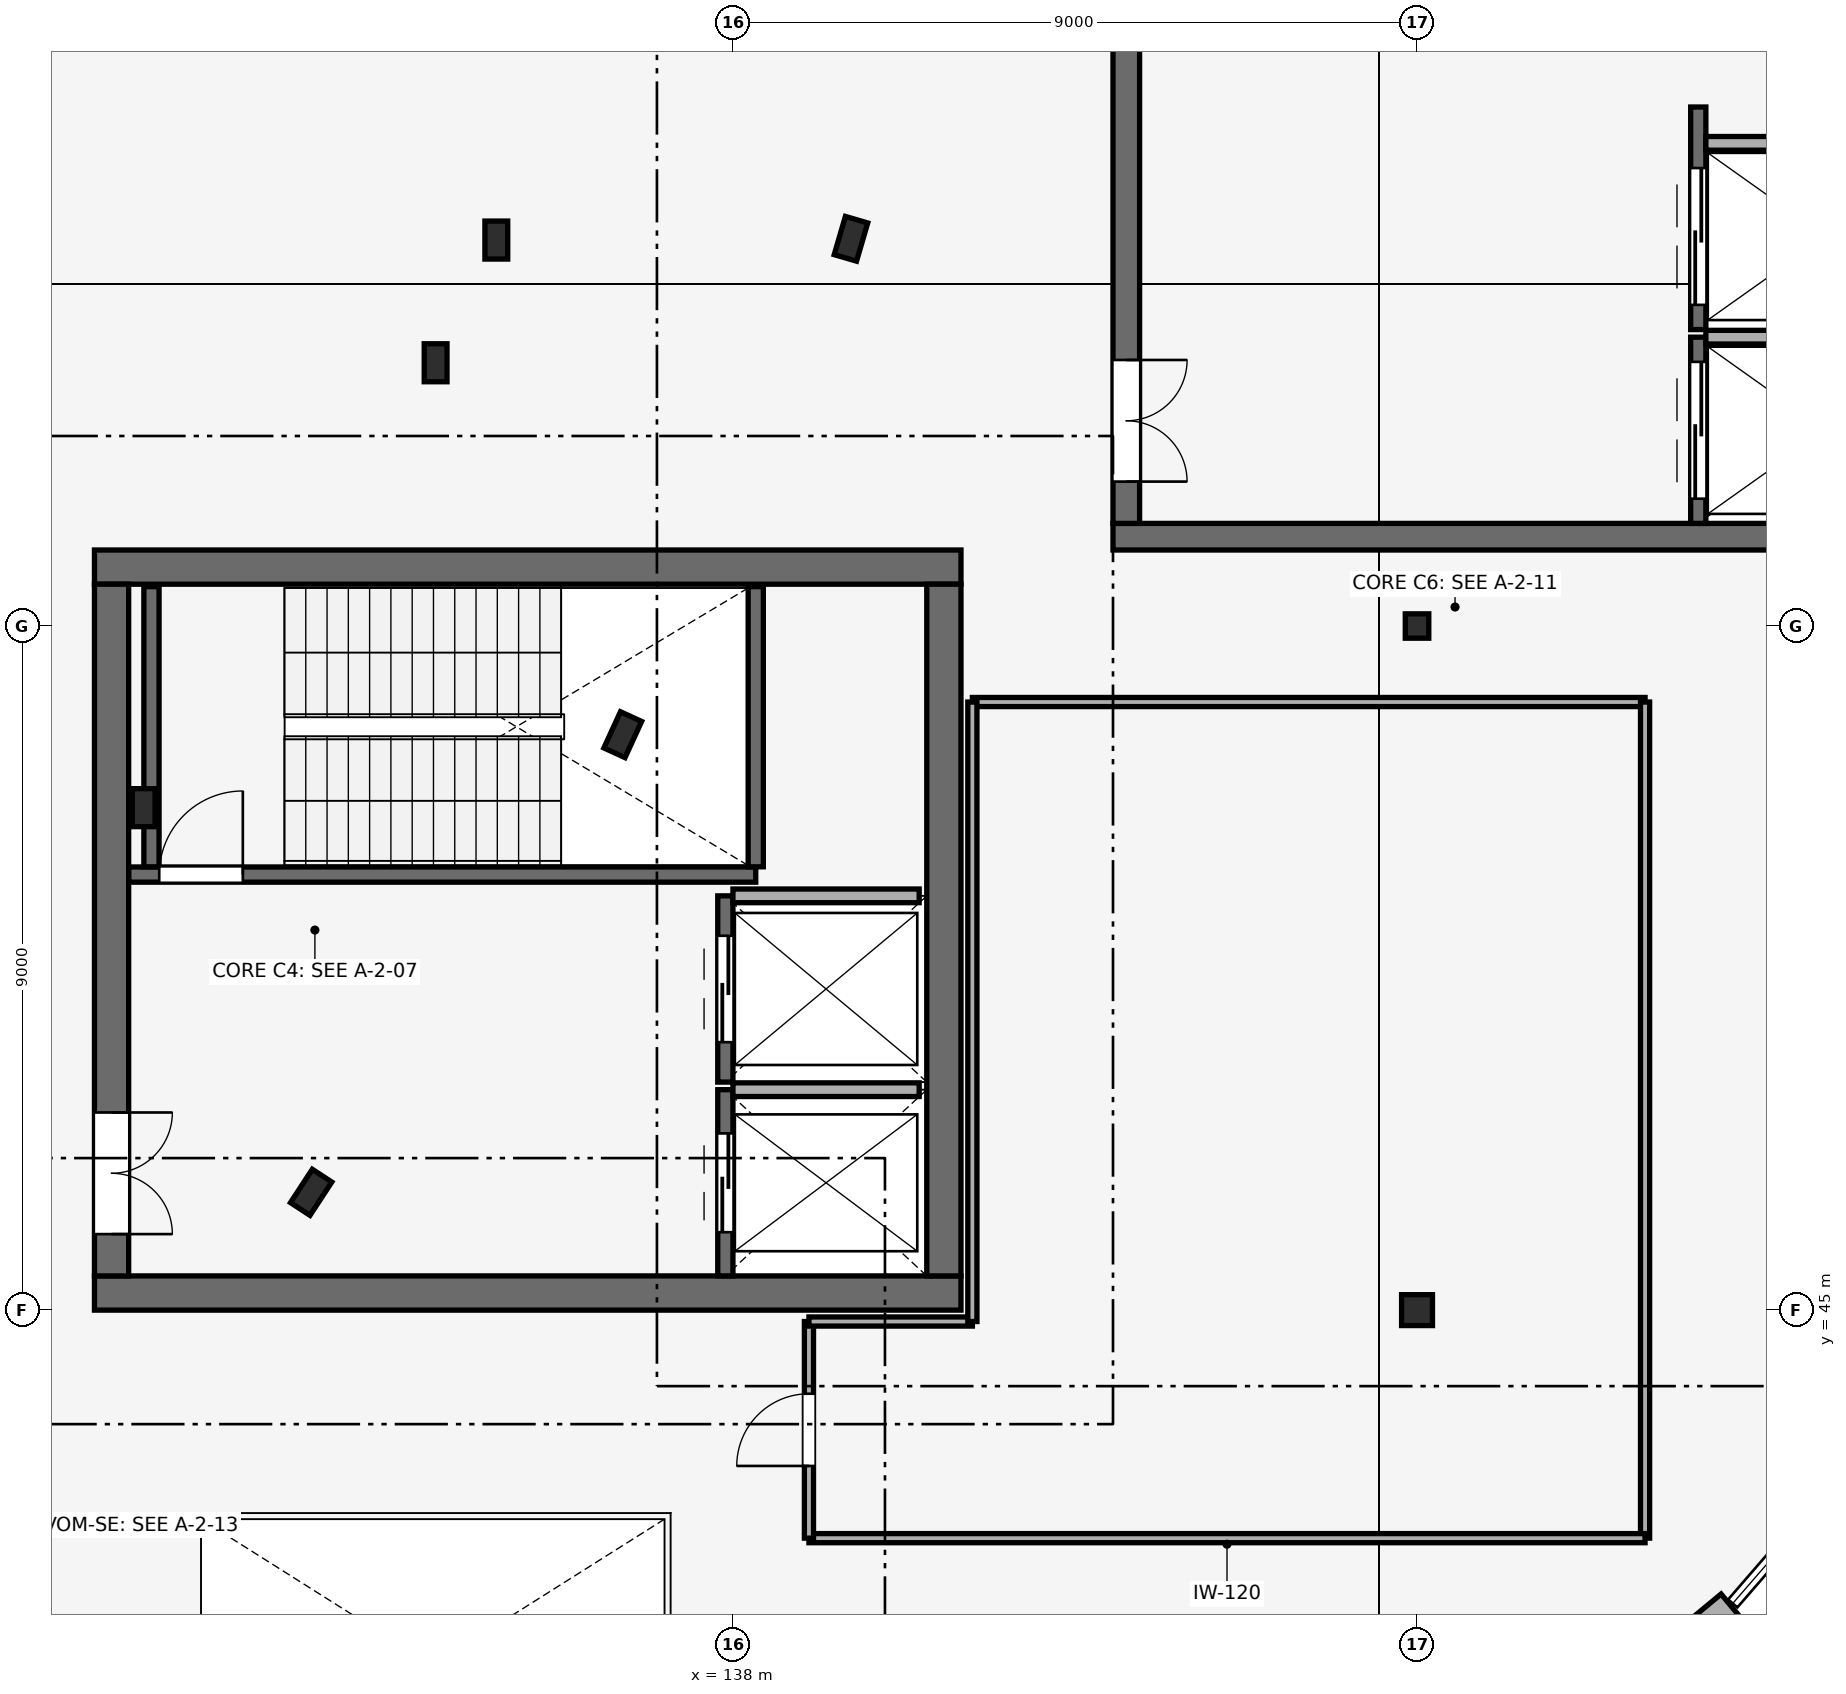
"""IFC4 building model, lengths in metres.
Left out: names, types, materials, properties, quantities, classifications, styles, units other than length and angle.
Written with IfcOpenShell. Run it as: python <this file> out.ifc"""

import sys

from ifc_helpers import new_model, si_unit, direction, frame, frame_2d, origin, origin_2d, place, context, subcontext, project, spatial, rectangle, hollow_circle, i_section, extrude, element, fill, save


model = new_model("IFC4")
c1 = context("Model", 3, precision=1e-05, world=origin(), true_north=direction((0.0, 1.0)))
c2 = subcontext(c1, "Body", "Model", "MODEL_VIEW")
j1 = project(units=[si_unit("LENGTHUNIT", "METRE"), si_unit("PLANEANGLEUNIT", "RADIAN")], contexts=[c1])
p1 = place(None, origin())
s1 = spatial("IfcSite", under=j1, at=p1, CompositionType="ELEMENT")
p2 = place(p1, origin())
s2 = spatial("IfcBuilding", under=s1, at=p2, CompositionType="ELEMENT")
p3 = place(p2, frame((0.0, 0.0, 5.4)))
s3 = spatial("IfcBuildingStorey", under=s2, at=p3, CompositionType="ELEMENT", Elevation=5.4)
for number, where, z_axis, x_axis in (
    (1, (132.451, 46.55, 0.0), (0.0, 0.0, 1.0), (0.837, -0.547, 0.0)),
    (2, (136.55, 52.57, 0.0), (0.0, 0.0, 1.0), (0.909, -0.417, 0.0)),
    (3, (139.553, 59.094, 0.0), (0.0, 0.0, 1.0), (0.96, -0.281, 0.0)),
):
    element("IfcColumn", number, at=place(p3, frame(where, z_axis=z_axis, x_axis=x_axis)), inside=s3, PredefinedType="COLUMN", context=c2, shape_type="SweptSolid", body=[
        extrude(i_section(OverallWidth=0.306, OverallDepth=0.524, WebThickness=0.021, FlangeThickness=0.04, FilletRadius=0.027, at=origin_2d()), origin(), (0.0, 0.0, 1.0), 4.8),
    ])
for number, where, z_axis, x_axis in (
    (4, (134.088, 57.463, 0.0), (0.0, 0.0, 1.0), (1.0, 0.0, 0.0)),
    (5, (134.887, 59.077, 0.0), (0.0, 0.0, 1.0), (1.0, 0.0, 0.0)),
):
    element("IfcColumn", number, at=place(p3, frame(where, z_axis=z_axis, x_axis=x_axis)), inside=s3, PredefinedType="COLUMN", context=c2, shape_type="SweptSolid", body=[
        extrude(i_section(OverallWidth=0.3, OverallDepth=0.5, WebThickness=0.014, FlangeThickness=0.028, FilletRadius=0.027, at=origin_2d()), origin(), (0.0, 0.0, 1.0), 4.8),
    ])
p4 = place(p3, frame((147.0, 45.0, 0.0), z_axis=(0.0, 0.0, 1.0), x_axis=(1.0, 0.0, 0.0)))
e6 = element("IfcColumn", 6, at=p4, inside=s3, PredefinedType="COLUMN", context=c2, shape_type="SweptSolid", body=[
    extrude(hollow_circle(Radius=0.203, WallThickness=0.016, at=origin_2d()), origin(), (0.0, 0.0, 1.0), 4.8),
])
p5 = place(p3, frame((147.0, 54.0, 0.0), z_axis=(0.0, 0.0, 1.0), x_axis=(1.0, 0.0, 0.0)))
e7 = element("IfcColumn", 7, at=p5, inside=s3, PredefinedType="COLUMN", context=c2, shape_type="SweptSolid", body=[
    extrude(i_section(OverallWidth=0.309, OverallDepth=0.321, WebThickness=0.014, FlangeThickness=0.022, FilletRadius=0.015, at=origin_2d()), origin(), (0.0, 0.0, 1.0), 4.8),
])
for number, where, z_axis, x_axis in (
    (8, (129.6, 45.225, 0.0), (0.0, 0.0, 1.0), (1.0, 0.0, 0.0)),
    (9, (129.6, 54.775, 0.0), (0.0, 0.0, 1.0), (1.0, 0.0, 0.0)),
):
    element("IfcWall", number, at=place(p3, frame(where, z_axis=z_axis, x_axis=x_axis)), inside=s3, PredefinedType="SHEAR", context=c2, shape_type="SweptSolid", body=[
        extrude(rectangle(XDim=11.4, YDim=0.45, at=frame_2d((5.7, 0.0))), origin(), (0.0, 0.0, 1.0), 4.8),
    ])
p6 = place(p3, frame((129.825, 45.45, 0.0), z_axis=(0.0, 0.0, 1.0), x_axis=(0.0, 1.0, 0.0)))
e10 = element("IfcWall", 10, at=p6, inside=s3, PredefinedType="SHEAR", context=c2, shape_type="SweptSolid", body=[
    extrude(rectangle(XDim=9.1, YDim=0.45, at=frame_2d((4.55, 0.0))), origin(), (0.0, 0.0, 1.0), 4.8),
])
p7 = place(p6, frame((0.55, 0.0, 0.0)))
e11 = element("IfcOpeningElement", 11, at=p7, cuts=e10, PredefinedType="OPENING", context=c2, shape_type="SweptSolid", body=[
    extrude(rectangle(XDim=1.6, YDim=2.2, at=frame_2d((0.8, 1.1))), frame((0.0, 0.235, 0.0), z_axis=(0.0, -1.0, 0.0), x_axis=(1.0, 0.0, 0.0)), (0.0, 0.0, 1.0), 0.47),
])
p8 = place(p3, frame((140.775, 45.45, 0.0), z_axis=(0.0, 0.0, 1.0), x_axis=(0.0, 1.0, 0.0)))
e12 = element("IfcWall", 12, at=p8, inside=s3, PredefinedType="SHEAR", context=c2, shape_type="SweptSolid", body=[
    extrude(rectangle(XDim=9.1, YDim=0.45, at=frame_2d((4.55, 0.0))), origin(), (0.0, 0.0, 1.0), 4.8),
])
p9 = place(p3, frame((143.0, 55.175, 0.0), z_axis=(0.0, 0.0, 1.0), x_axis=(1.0, 0.0, 0.0)))
e13 = element("IfcWall", 13, at=p9, inside=s3, PredefinedType="SHEAR", context=c2, shape_type="SweptSolid", body=[
    extrude(rectangle(XDim=11.4, YDim=0.35, at=frame_2d((5.7, 0.0))), origin(), (0.0, 0.0, 1.0), 4.8),
])
p10 = place(p3, frame((143.175, 55.35, 0.0), z_axis=(0.0, 0.0, 1.0), x_axis=(0.0, 1.0, 0.0)))
e14 = element("IfcWall", 14, at=p10, inside=s3, PredefinedType="SHEAR", context=c2, shape_type="SweptSolid", body=[
    extrude(rectangle(XDim=9.3, YDim=0.35, at=frame_2d((4.65, 0.0))), origin(), (0.0, 0.0, 1.0), 4.8),
])
p11 = place(p10, frame((0.55, 0.0, 0.0)))
e15 = element("IfcOpeningElement", 15, at=p11, cuts=e14, PredefinedType="OPENING", context=c2, shape_type="SweptSolid", body=[
    extrude(rectangle(XDim=1.6, YDim=2.2, at=frame_2d((0.8, 1.1))), frame((0.0, 0.185, 0.0), z_axis=(0.0, -1.0, 0.0), x_axis=(1.0, 0.0, 0.0)), (0.0, 0.0, 1.0), 0.37),
])
p12 = place(p3, frame((130.248, 51.611, 0.0), z_axis=(0.0, 0.0, 1.0), x_axis=(1.0, 0.0, 0.0)))
e16 = element("IfcColumn", 16, at=p12, inside=s3, PredefinedType="COLUMN", context=c2, shape_type="SweptSolid", body=[
    extrude(i_section(OverallWidth=0.3, OverallDepth=0.5, WebThickness=0.014, FlangeThickness=0.028, FilletRadius=0.027, at=origin_2d()), origin(), (0.0, 0.0, 1.0), 4.8),
])
p13 = place(p3, frame((151.128, 41.111, 0.0), z_axis=(0.0, 0.0, 1.0), x_axis=(-0.770002821077, -0.638040481109, 0.0)))
e17 = element("IfcWall", 17, at=p13, inside=s3, PredefinedType="STANDARD", context=c2, shape_type="SweptSolid", body=[
    extrude(rectangle(XDim=9.51, YDim=0.4, at=frame_2d((4.755, 0.0))), origin(), (0.0, 0.0, 1.0), 4.52),
])
p14 = place(p13, frame((3.155, 0.0, 0.95)))
e18 = element("IfcOpeningElement", 18, at=p14, cuts=e17, PredefinedType="OPENING", context=c2, shape_type="SweptSolid", body=[
    extrude(rectangle(XDim=3.2, YDim=1.8, at=frame_2d((1.6, 0.9))), frame((0.0, 0.21, 0.0), z_axis=(0.0, -1.0, 0.0), x_axis=(1.0, 0.0, 0.0)), (0.0, 0.0, 1.0), 0.42),
])
p15 = place(p3, frame((137.9, 45.45, 0.0), z_axis=(0.0, 0.0, 1.0), x_axis=(0.0, 1.0, 0.0)))
e19 = element("IfcWall", 19, at=p15, inside=s3, PredefinedType="SHEAR", context=c2, shape_type="SweptSolid", body=[
    extrude(rectangle(XDim=2.45, YDim=0.2, at=frame_2d((1.225, 0.0))), origin(), (0.0, 0.0, 1.0), 4.52),
])
p16 = place(p15, frame((0.575, 0.0, 0.0)))
e20 = element("IfcOpeningElement", 20, at=p16, cuts=e19, PredefinedType="OPENING", context=c2, shape_type="SweptSolid", body=[
    extrude(rectangle(XDim=1.3, YDim=2.2, at=frame_2d((0.65, 1.1))), frame((0.0, 0.11, 0.0), z_axis=(0.0, -1.0, 0.0), x_axis=(1.0, 0.0, 0.0)), (0.0, 0.0, 1.0), 0.22),
])
p17 = place(p3, frame((138.0, 47.9, 0.0), z_axis=(0.0, 0.0, 1.0), x_axis=(1.0, 0.0, 0.0)))
e21 = element("IfcWall", 21, at=p17, inside=s3, PredefinedType="PARTITIONING", context=c2, shape_type="SweptSolid", body=[
    extrude(rectangle(XDim=2.45, YDim=0.18, at=frame_2d((1.225, 0.0))), origin(), (0.0, 0.0, 1.0), 4.8),
])
p18 = place(p3, frame((137.9, 48.0, 0.0), z_axis=(0.0, 0.0, 1.0), x_axis=(0.0, 1.0, 0.0)))
e22 = element("IfcWall", 22, at=p18, inside=s3, PredefinedType="SHEAR", context=c2, shape_type="SweptSolid", body=[
    extrude(rectangle(XDim=2.45, YDim=0.2, at=frame_2d((1.225, 0.0))), origin(), (0.0, 0.0, 1.0), 4.52),
])
p19 = place(p18, frame((0.525, 0.0, 0.0)))
e23 = element("IfcOpeningElement", 23, at=p19, cuts=e22, PredefinedType="OPENING", context=c2, shape_type="SweptSolid", body=[
    extrude(rectangle(XDim=1.4, YDim=2.2, at=frame_2d((0.7, 1.1))), frame((0.0, 0.11, 0.0), z_axis=(0.0, -1.0, 0.0), x_axis=(1.0, 0.0, 0.0)), (0.0, 0.0, 1.0), 0.22),
])
p20 = place(p3, frame((138.0, 50.45, 0.0), z_axis=(0.0, 0.0, 1.0), x_axis=(1.0, 0.0, 0.0)))
e24 = element("IfcWall", 24, at=p20, inside=s3, PredefinedType="PARTITIONING", context=c2, shape_type="SweptSolid", body=[
    extrude(rectangle(XDim=2.45, YDim=0.18, at=frame_2d((1.225, 0.0))), origin(), (0.0, 0.0, 1.0), 4.8),
])
p21 = place(p3, frame((150.7, 55.35, 0.0), z_axis=(0.0, 0.0, 1.0), x_axis=(0.0, 1.0, 0.0)))
e25 = element("IfcWall", 25, at=p21, inside=s3, PredefinedType="SHEAR", context=c2, shape_type="SweptSolid", body=[
    extrude(rectangle(XDim=2.45, YDim=0.2, at=frame_2d((1.225, 0.0))), origin(), (0.0, 0.0, 1.0), 4.52),
])
p22 = place(p21, frame((0.325, 0.0, 0.0)))
e26 = element("IfcOpeningElement", 26, at=p22, cuts=e25, PredefinedType="OPENING", context=c2, shape_type="SweptSolid", body=[
    extrude(rectangle(XDim=1.8, YDim=2.4, at=frame_2d((0.9, 1.2))), frame((0.0, 0.11, 0.0), z_axis=(0.0, -1.0, 0.0), x_axis=(1.0, 0.0, 0.0)), (0.0, 0.0, 1.0), 0.22),
])
p23 = place(p3, frame((150.8, 57.8, 0.0), z_axis=(0.0, 0.0, 1.0), x_axis=(1.0, 0.0, 0.0)))
e27 = element("IfcWall", 27, at=p23, inside=s3, PredefinedType="PARTITIONING", context=c2, shape_type="SweptSolid", body=[
    extrude(rectangle(XDim=3.15, YDim=0.18, at=frame_2d((1.575, 0.0))), origin(), (0.0, 0.0, 1.0), 4.8),
])
p24 = place(p3, frame((150.7, 57.9, 0.0), z_axis=(0.0, 0.0, 1.0), x_axis=(0.0, 1.0, 0.0)))
e28 = element("IfcWall", 28, at=p24, inside=s3, PredefinedType="SHEAR", context=c2, shape_type="SweptSolid", body=[
    extrude(rectangle(XDim=2.928, YDim=0.2, at=frame_2d((1.464, 0.0))), origin(), (0.0, 0.0, 1.0), 4.52),
])
p25 = place(p24, frame((0.325, 0.0, 0.0)))
e29 = element("IfcOpeningElement", 29, at=p25, cuts=e28, PredefinedType="OPENING", context=c2, shape_type="SweptSolid", body=[
    extrude(rectangle(XDim=1.8, YDim=2.4, at=frame_2d((0.9, 1.2))), frame((0.0, 0.11, 0.0), z_axis=(0.0, -1.0, 0.0), x_axis=(1.0, 0.0, 0.0)), (0.0, 0.0, 1.0), 0.22),
])
p26 = place(p3, frame((150.8, 60.35, 0.0), z_axis=(0.0, 0.0, 1.0), x_axis=(1.0, 0.0, 0.0)))
e30 = element("IfcWall", 30, at=p26, inside=s3, PredefinedType="PARTITIONING", context=c2, shape_type="SweptSolid", body=[
    extrude(rectangle(XDim=3.15, YDim=0.18, at=frame_2d((1.575, 0.0))), origin(), (0.0, 0.0, 1.0), 4.8),
])
p27 = place(p3, frame((130.052, 50.73, 0.0), z_axis=(0.0, 0.0, 1.0), x_axis=(1.0, 0.0, 0.0)))
e31 = element("IfcWall", 31, at=p27, inside=s3, PredefinedType="SHEAR", context=c2, shape_type="SweptSolid", body=[
    extrude(rectangle(XDim=8.248, YDim=0.2, at=frame_2d((4.124, 0.0))), origin(), (0.0, 0.0, 1.0), 4.8),
])
p28 = place(p27, frame((0.4, 0.0, 0.0)))
e32 = element("IfcOpeningElement", 32, at=p28, cuts=e31, PredefinedType="OPENING", context=c2, shape_type="SweptSolid", body=[
    extrude(rectangle(XDim=1.1, YDim=2.15, at=frame_2d((0.55, 1.075))), frame((0.0, 0.11, 0.0), z_axis=(0.0, -1.0, 0.0), x_axis=(1.0, 0.0, 0.0)), (0.0, 0.0, 1.0), 0.22),
])
for number, where, z_axis, x_axis in (
    (33, (130.35, 50.832, 0.0), (0.0, 0.0, 1.0), (0.0, 1.0, 0.0)),
    (34, (138.3, 50.832, 0.0), (0.0, 0.0, 1.0), (0.0, 1.0, 0.0)),
):
    element("IfcWall", number, at=place(p3, frame(where, z_axis=z_axis, x_axis=x_axis)), inside=s3, PredefinedType="SHEAR", context=c2, shape_type="SweptSolid", body=[
        extrude(rectangle(XDim=3.686, YDim=0.2, at=frame_2d((1.843, 0.0))), origin(), (0.0, 0.0, 1.0), 4.8),
    ])
p29 = place(p3, frame((141.15, 53.0, 0.0), z_axis=(0.0, 0.0, 1.0), x_axis=(1.0, 0.0, 0.0)))
e35 = element("IfcWall", 35, at=p29, inside=s3, PredefinedType="PARTITIONING", context=c2, shape_type="SweptSolid", body=[
    extrude(rectangle(XDim=8.85, YDim=0.12, at=frame_2d((4.425, 0.0))), origin(), (0.0, 0.0, 1.0), 4.52),
])
for number, where, z_axis, x_axis in (
    (36, (150.0, 53.0, 0.0), (0.0, 0.0, 1.0), (0.0, -1.0, 0.0)),
    (37, (150.0, 42.0, 0.0), (0.0, 0.0, 1.0), (-1.0, 0.0, 0.0)),
):
    element("IfcWall", number, at=place(p3, frame(where, z_axis=z_axis, x_axis=x_axis)), inside=s3, PredefinedType="PARTITIONING", context=c2, shape_type="SweptSolid", body=[
        extrude(rectangle(XDim=11.0, YDim=0.12, at=frame_2d((5.5, 0.0))), origin(), (0.0, 0.0, 1.0), 4.52),
    ])
p30 = place(p3, frame((139.0, 42.0, 0.0), z_axis=(0.0, 0.0, 1.0), x_axis=(0.0, 1.0, 0.0)))
e38 = element("IfcWall", 38, at=p30, inside=s3, PredefinedType="PARTITIONING", context=c2, shape_type="SweptSolid", body=[
    extrude(rectangle(XDim=2.85, YDim=0.12, at=frame_2d((1.425, 0.0))), origin(), (0.0, 0.0, 1.0), 4.52),
])
p31 = place(p30, frame((0.95, 0.0, 0.0)))
e39 = element("IfcOpeningElement", 39, at=p31, cuts=e38, PredefinedType="OPENING", context=c2, shape_type="SweptSolid", body=[
    extrude(rectangle(XDim=0.95, YDim=2.1, at=frame_2d((0.475, 1.05))), frame((0.0, 0.07, 0.0), z_axis=(0.0, -1.0, 0.0), x_axis=(1.0, 0.0, 0.0)), (0.0, 0.0, 1.0), 0.14),
])
p32 = place(p3, frame((139.0, 44.85, 0.0), z_axis=(0.0, 0.0, 1.0), x_axis=(1.0, 0.0, 0.0)))
e40 = element("IfcWall", 40, at=p32, inside=s3, PredefinedType="PARTITIONING", context=c2, shape_type="SweptSolid", body=[
    extrude(rectangle(XDim=2.15, YDim=0.12, at=frame_2d((1.075, 0.0))), origin(), (0.0, 0.0, 1.0), 4.52),
])
p33 = place(p3, frame((141.15, 44.85, 0.0), z_axis=(0.0, 0.0, 1.0), x_axis=(0.0, 1.0, 0.0)))
e41 = element("IfcWall", 41, at=p33, inside=s3, PredefinedType="PARTITIONING", context=c2, shape_type="SweptSolid", body=[
    extrude(rectangle(XDim=8.15, YDim=0.12, at=frame_2d((4.075, 0.0))), origin(), (0.0, 0.0, 1.0), 4.52),
])
p34 = place(p16, origin())
e42 = element("IfcDoor", 42, at=p34, inside=s3, OperationType="DOUBLE_DOOR_SLIDING", PredefinedType="DOOR", context=c2, shape_type="SweptSolid", body=[
    extrude(rectangle(XDim=1.3, YDim=2.2, at=frame_2d((0.65, 1.1))), frame((0.0, 0.025, 0.0), z_axis=(0.0, -1.0, 0.0), x_axis=(1.0, 0.0, 0.0)), (0.0, 0.0, 1.0), 0.05),
])
fill(e20, e42)
p35 = place(p19, origin())
e43 = element("IfcDoor", 43, at=p35, inside=s3, OperationType="DOUBLE_DOOR_SLIDING", PredefinedType="DOOR", context=c2, shape_type="SweptSolid", body=[
    extrude(rectangle(XDim=1.4, YDim=2.2, at=frame_2d((0.7, 1.1))), frame((0.0, 0.025, 0.0), z_axis=(0.0, -1.0, 0.0), x_axis=(1.0, 0.0, 0.0)), (0.0, 0.0, 1.0), 0.05),
])
fill(e23, e43)
p36 = place(p22, origin())
e44 = element("IfcDoor", 44, at=p36, inside=s3, OperationType="DOUBLE_DOOR_SLIDING", PredefinedType="DOOR", context=c2, shape_type="SweptSolid", body=[
    extrude(rectangle(XDim=1.8, YDim=2.4, at=frame_2d((0.9, 1.2))), frame((0.0, 0.025, 0.0), z_axis=(0.0, -1.0, 0.0), x_axis=(1.0, 0.0, 0.0)), (0.0, 0.0, 1.0), 0.05),
])
fill(e26, e44)
p37 = place(p25, origin())
e45 = element("IfcDoor", 45, at=p37, inside=s3, OperationType="DOUBLE_DOOR_SLIDING", PredefinedType="DOOR", context=c2, shape_type="SweptSolid", body=[
    extrude(rectangle(XDim=1.8, YDim=2.4, at=frame_2d((0.9, 1.2))), frame((0.0, 0.025, 0.0), z_axis=(0.0, -1.0, 0.0), x_axis=(1.0, 0.0, 0.0)), (0.0, 0.0, 1.0), 0.05),
])
fill(e29, e45)
p38 = place(p28, frame((1.1, 0.0, 0.0), z_axis=(0.0, 0.0, 1.0), x_axis=(-1.0, 0.0, 0.0)))
e46 = element("IfcDoor", 46, at=p38, inside=s3, OperationType="SINGLE_SWING_LEFT", PredefinedType="DOOR", context=c2, shape_type="SweptSolid", body=[
    extrude(rectangle(XDim=1.1, YDim=2.15, at=frame_2d((0.55, 1.075))), frame((0.0, 0.025, 0.0), z_axis=(0.0, -1.0, 0.0), x_axis=(1.0, 0.0, 0.0)), (0.0, 0.0, 1.0), 0.05),
])
fill(e32, e46)
p39 = place(p7, frame((1.6, 0.0, 0.0), z_axis=(0.0, 0.0, 1.0), x_axis=(-1.0, 0.0, 0.0)))
e47 = element("IfcDoor", 47, at=p39, inside=s3, OperationType="DOUBLE_DOOR_SINGLE_SWING", PredefinedType="DOOR", context=c2, shape_type="SweptSolid", body=[
    extrude(rectangle(XDim=1.6, YDim=2.2, at=frame_2d((0.8, 1.1))), frame((0.0, 0.025, 0.0), z_axis=(0.0, -1.0, 0.0), x_axis=(1.0, 0.0, 0.0)), (0.0, 0.0, 1.0), 0.05),
])
fill(e11, e47)
p40 = place(p11, frame((1.6, 0.0, 0.0), z_axis=(0.0, 0.0, 1.0), x_axis=(-1.0, 0.0, 0.0)))
e48 = element("IfcDoor", 48, at=p40, inside=s3, OperationType="DOUBLE_DOOR_SINGLE_SWING", PredefinedType="DOOR", context=c2, shape_type="SweptSolid", body=[
    extrude(rectangle(XDim=1.6, YDim=2.2, at=frame_2d((0.8, 1.1))), frame((0.0, 0.025, 0.0), z_axis=(0.0, -1.0, 0.0), x_axis=(1.0, 0.0, 0.0)), (0.0, 0.0, 1.0), 0.05),
])
fill(e15, e48)
p41 = place(p31, origin())
e49 = element("IfcDoor", 49, at=p41, inside=s3, OperationType="SINGLE_SWING_LEFT", PredefinedType="DOOR", context=c2, shape_type="SweptSolid", body=[
    extrude(rectangle(XDim=0.95, YDim=2.1, at=frame_2d((0.475, 1.05))), frame((0.0, 0.025, 0.0), z_axis=(0.0, -1.0, 0.0), x_axis=(1.0, 0.0, 0.0)), (0.0, 0.0, 1.0), 0.05),
])
fill(e39, e49)
save(model, sys.argv[1])
